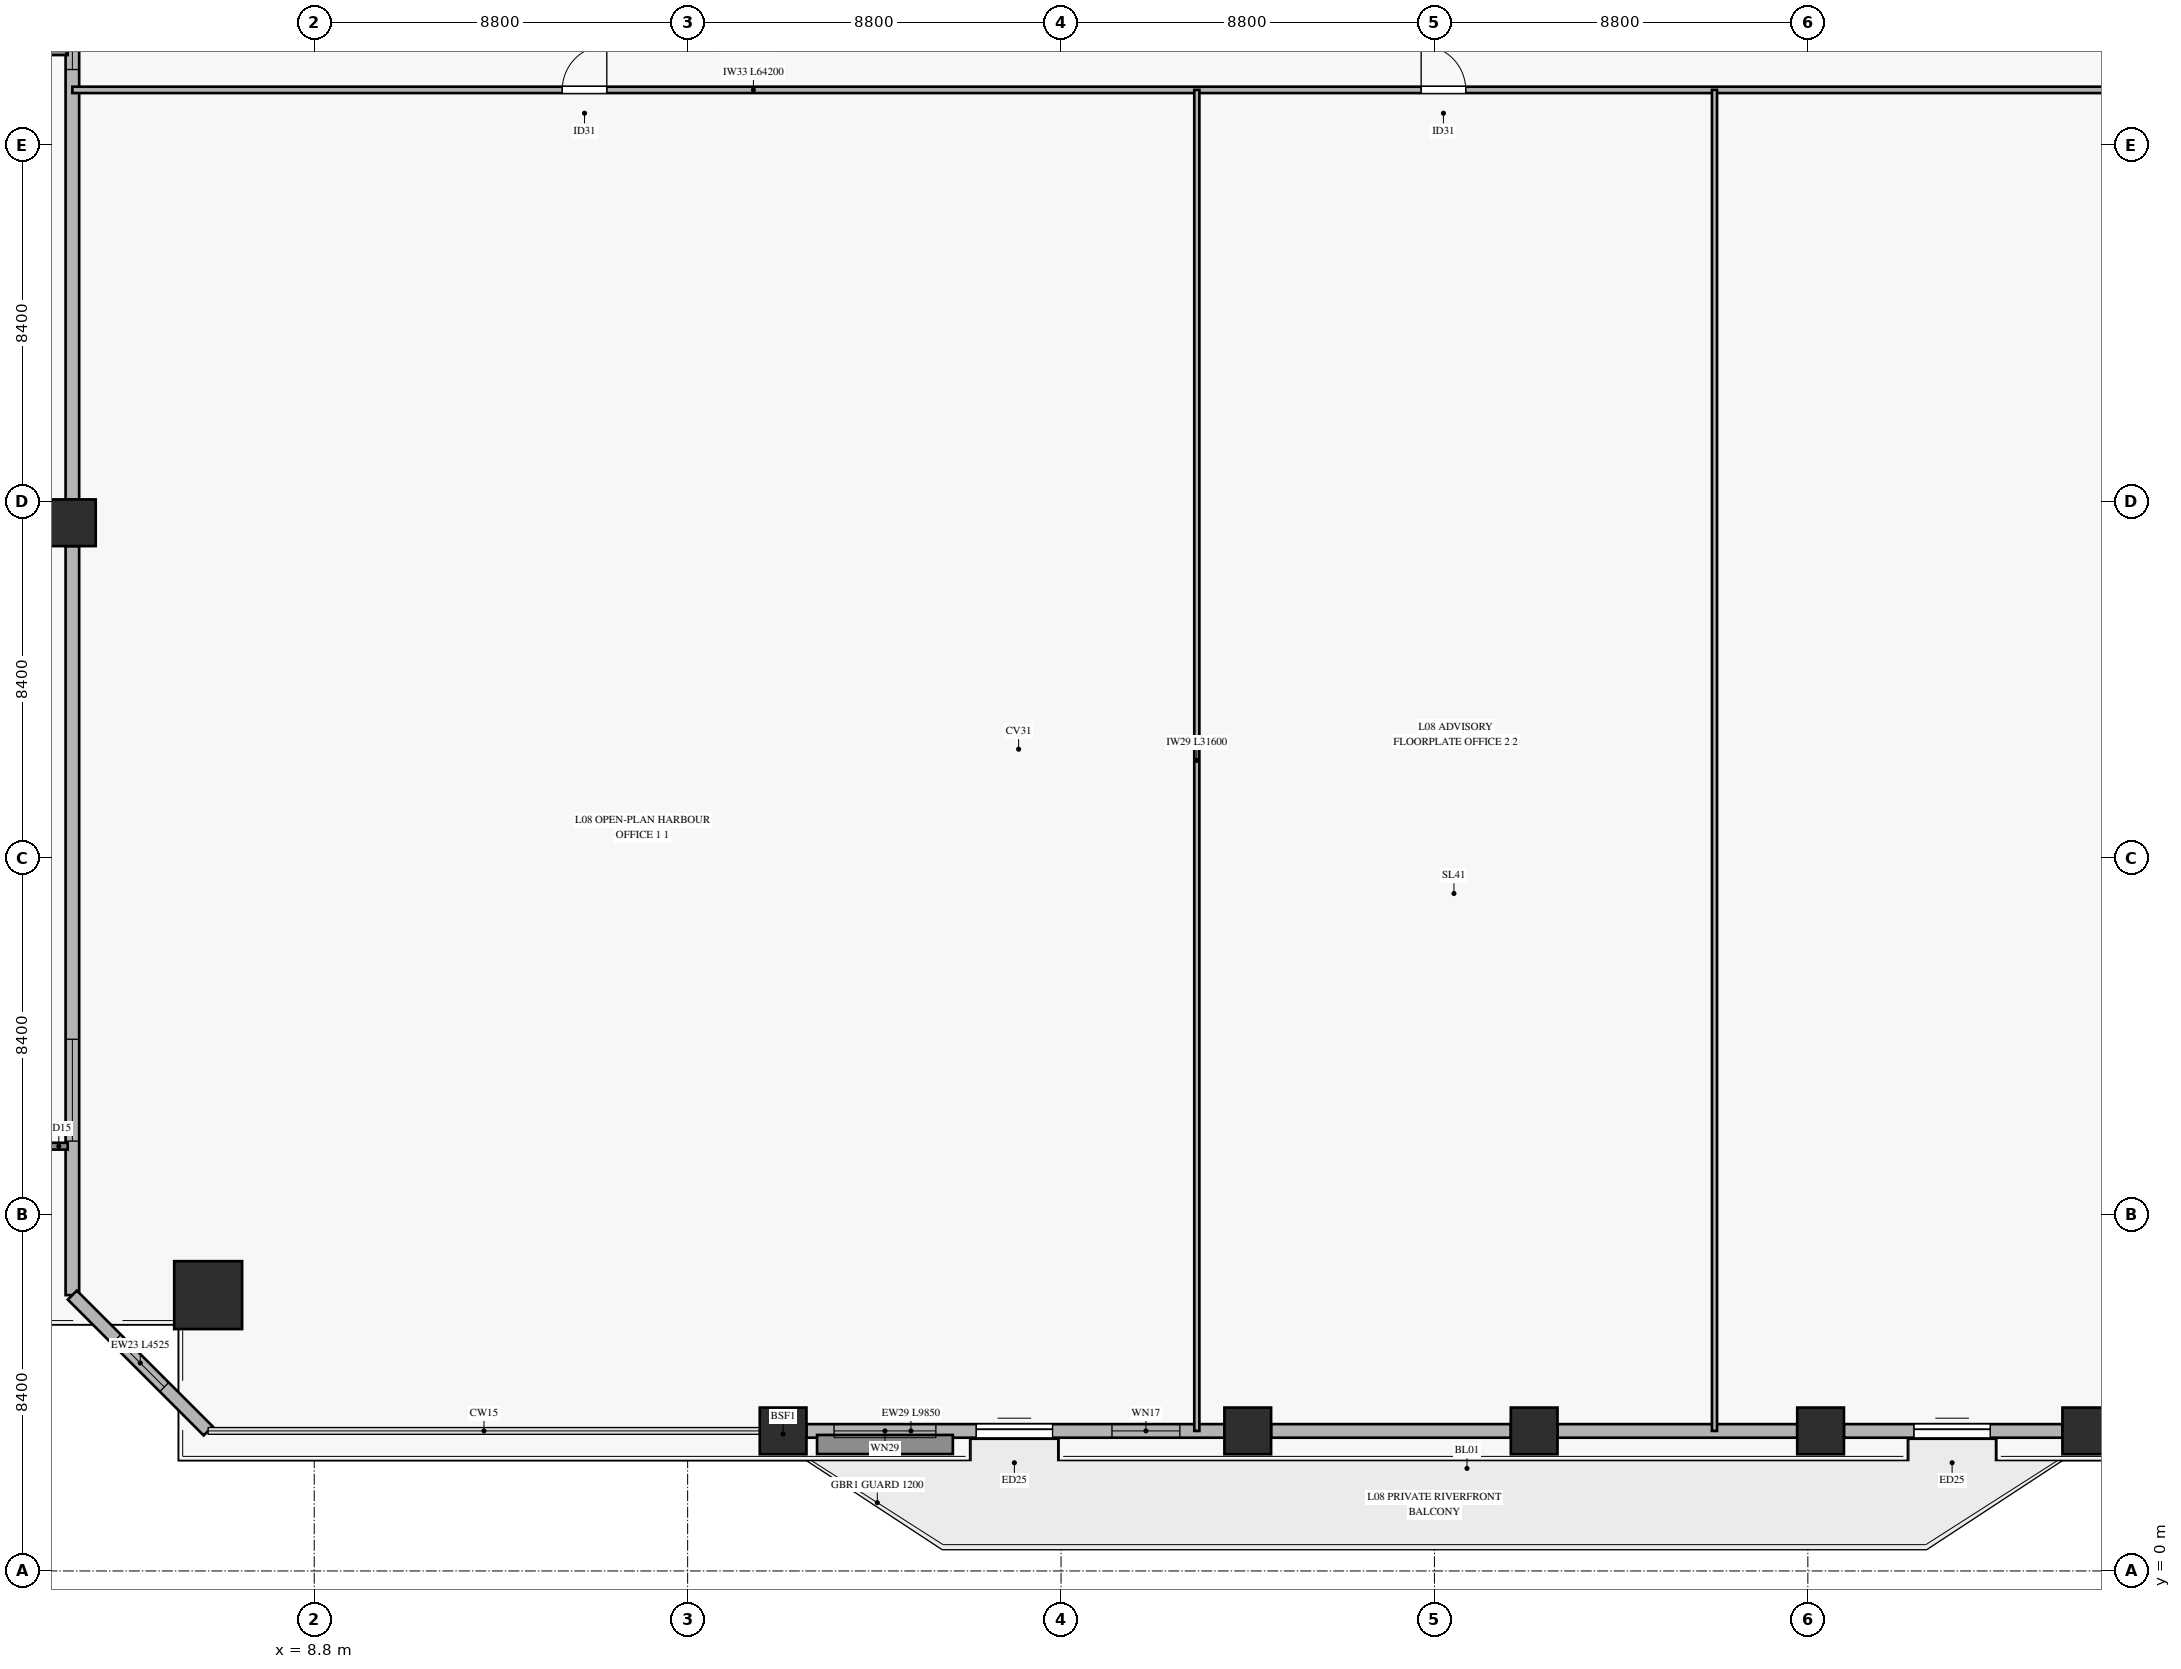
"""IFC4 building model, lengths in metres.
Left out: names, types, materials, properties, quantities, classifications, styles, units other than length and angle.
Written with IfcOpenShell. Run it as: python <this file> out.ifc"""

import sys

from ifc_helpers import new_model, si_unit, direction, frame, frame_2d, origin, origin_2d, place, context, subcontext, project, spatial, rectangle, hollow_rectangle, extrude, source, transform, mapped, element, fill, save


model = new_model("IFC4")
c1 = context("Model", 3, precision=1e-05, world=origin(), true_north=direction((0.0, 1.0)))
c2 = subcontext(c1, "Body", "Model", "MODEL_VIEW")
j1 = project(units=[si_unit("LENGTHUNIT", "METRE"), si_unit("PLANEANGLEUNIT", "RADIAN")], contexts=[c1])
p1 = place(None, origin())
s1 = spatial("IfcSite", under=j1, at=p1, CompositionType="ELEMENT")
p2 = place(p1, origin())
s2 = spatial("IfcBuilding", under=s1, at=p2, CompositionType="ELEMENT")
p3 = place(p2, frame((0.0, 0.0, 33.2)))
s3 = spatial("IfcBuildingStorey", under=s2, at=p3, CompositionType="ELEMENT", Elevation=33.2)
m1 = source(origin(), c2, "Body", "SweptSolid", [
    extrude(hollow_rectangle(XDim=1.6, YDim=1.6, WallThickness=0.075, at=origin_2d()), origin(), (0.0, 0.0, 1.0), 3.72),
])
p4 = place(p3, frame((6.3, 6.5, 0.0), z_axis=(0.056182353256, 0.134680127199, 0.989295105881), x_axis=(-0.922917163749, 0.384998582929, 0.0)))
e1 = element("IfcColumn", 1, at=p4, inside=s3, PredefinedType="COLUMN", context=c2, shape_type="MappedRepresentation", body=[
    mapped(m1, transform((0.0, 0.0, 0.0), x_axis=(1.0, 0.0, 0.0), y_axis=(0.0, 1.0, 0.0), z_axis=(0.0, 0.0, 1.0), scale=1.0)),
])
m2 = source(origin(), c2, "Body", "SweptSolid", [
    extrude(hollow_rectangle(XDim=1.1, YDim=1.1, WallThickness=0.05, at=origin_2d()), origin(), (0.0, 0.0, 1.0), 3.718),
])
for number, where, z_axis, x_axis in (
    (2, (19.85, 3.3, 0.0), (0.0, 0.142, 0.99), (-1.0, 0.0, 0.0)),
    (3, (30.8, 3.3, 0.0), (0.0, 0.142, 0.99), (-1.0, 0.0, 0.0)),
    (4, (37.55, 3.3, 0.0), (0.0, 0.142, 0.99), (-1.0, 0.0, 0.0)),
    (5, (44.3, 3.3, 0.0), (0.0, 0.142, 0.99), (-1.0, 0.0, 0.0)),
    (6, (50.55, 3.3, 0.0), (0.0, 0.142, 0.99), (-1.0, 0.0, 0.0)),
):
    element("IfcColumn", number, at=place(p3, frame(where, z_axis=z_axis, x_axis=x_axis)), inside=s3, PredefinedType="COLUMN", context=c2, shape_type="MappedRepresentation", body=[
        mapped(m2, transform((0.0, 0.0, 0.0), x_axis=(1.0, 0.0, 0.0), y_axis=(0.0, 1.0, 0.0), z_axis=(0.0, 0.0, 1.0), scale=1.0)),
    ])
m3 = source(origin(), c2, "Body", "SweptSolid", [
    extrude(hollow_rectangle(XDim=1.1, YDim=1.1, WallThickness=0.05, at=origin_2d()), origin(), (0.0, 0.0, 1.0), 3.697),
])
p5 = place(p3, frame((3.1, 24.7, 0.0), z_axis=(0.063531823494, 0.071126584099, 0.995441970402), x_axis=(-0.745802491979, 0.666167128398, 0.0)))
e7 = element("IfcColumn", 7, at=p5, inside=s3, PredefinedType="COLUMN", context=c2, shape_type="MappedRepresentation", body=[
    mapped(m3, transform((0.0, 0.0, 0.0), x_axis=(1.0, 0.0, 0.0), y_axis=(0.0, 1.0, 0.0), z_axis=(0.0, 0.0, 1.0), scale=1.0)),
])
p6 = place(p3, frame((20.4, 3.3, 0.0), z_axis=(0.0, 0.0, 1.0), x_axis=(1.0, 0.0, 0.0)))
e8 = element("IfcWall", 8, at=p6, inside=s3, PredefinedType="SOLIDWALL", context=c2, shape_type="SweptSolid", body=[
    extrude(rectangle(XDim=9.85, YDim=0.32, at=frame_2d((4.925, 0.0))), origin(), (0.0, 0.0, 1.0), 3.16),
])
p7 = place(p6, frame((4.0, 0.0, 0.0)))
e9 = element("IfcOpeningElement", 9, at=p7, cuts=e8, PredefinedType="OPENING", context=c2, shape_type="SweptSolid", body=[
    extrude(rectangle(XDim=1.8, YDim=2.25, at=frame_2d((0.9, 1.125))), frame((0.0, 0.17, 0.0), z_axis=(0.0, -1.0, 0.0), x_axis=(1.0, 0.0, 0.0)), (0.0, 0.0, 1.0), 0.34),
])
p8 = place(p6, frame((0.65, 0.0, 0.45)))
e10 = element("IfcOpeningElement", 10, at=p8, cuts=e8, PredefinedType="OPENING", context=c2, shape_type="SweptSolid", body=[
    extrude(rectangle(XDim=2.4, YDim=2.1, at=frame_2d((1.2, 1.05))), frame((0.0, 0.17, 0.0), z_axis=(0.0, -1.0, 0.0), x_axis=(1.0, 0.0, 0.0)), (0.0, 0.0, 1.0), 0.34),
])
p9 = place(p6, frame((7.2, 0.0, 0.45)))
e11 = element("IfcOpeningElement", 11, at=p9, cuts=e8, PredefinedType="OPENING", context=c2, shape_type="SweptSolid", body=[
    extrude(rectangle(XDim=1.6, YDim=2.0, at=frame_2d((0.8, 1.0))), frame((0.0, 0.17, 0.0), z_axis=(0.0, -1.0, 0.0), x_axis=(1.0, 0.0, 0.0)), (0.0, 0.0, 1.0), 0.34),
])
for number, where, z_axis, x_axis in (
    (12, (31.35, 3.3, 0.0), (0.0, 0.0, 1.0), (1.0, 0.0, 0.0)),
    (13, (38.1, 3.3, 0.0), (0.0, 0.0, 1.0), (1.0, 0.0, 0.0)),
):
    element("IfcWall", number, at=place(p3, frame(where, z_axis=z_axis, x_axis=x_axis)), inside=s3, PredefinedType="SOLIDWALL", context=c2, shape_type="SweptSolid", body=[
        extrude(rectangle(XDim=5.65, YDim=0.32, at=frame_2d((2.825, 0.0))), origin(), (0.0, 0.0, 1.0), 3.16),
    ])
p10 = place(p3, frame((44.85, 3.3, 0.0), z_axis=(0.0, 0.0, 1.0), x_axis=(1.0, 0.0, 0.0)))
e14 = element("IfcWall", 14, at=p10, inside=s3, PredefinedType="SOLIDWALL", context=c2, shape_type="SweptSolid", body=[
    extrude(rectangle(XDim=5.15, YDim=0.32, at=frame_2d((2.575, 0.0))), origin(), (0.0, 0.0, 1.0), 3.16),
])
p11 = place(p10, frame((1.65, 0.0, 0.0)))
e15 = element("IfcOpeningElement", 15, at=p11, cuts=e14, PredefinedType="OPENING", context=c2, shape_type="SweptSolid", body=[
    extrude(rectangle(XDim=1.8, YDim=2.25, at=frame_2d((0.9, 1.125))), frame((0.0, 0.17, 0.0), z_axis=(0.0, -1.0, 0.0), x_axis=(1.0, 0.0, 0.0)), (0.0, 0.0, 1.0), 0.34),
])
p12 = place(p3, frame((3.1, 6.5, 0.0), z_axis=(0.0, 0.0, 1.0), x_axis=(0.0, 1.0, 0.0)))
e16 = element("IfcWall", 16, at=p12, inside=s3, PredefinedType="SOLIDWALL", context=c2, shape_type="SweptSolid", body=[
    extrude(rectangle(XDim=17.65, YDim=0.32, at=frame_2d((8.825, 0.0))), origin(), (0.0, 0.0, 1.0), 3.16),
])
p13 = place(p12, frame((3.629, 0.0, 0.45)))
e17 = element("IfcOpeningElement", 17, at=p13, cuts=e16, PredefinedType="OPENING", context=c2, shape_type="SweptSolid", body=[
    extrude(rectangle(XDim=2.4, YDim=2.1, at=frame_2d((1.2, 1.05))), frame((0.0, 0.17, 0.0), z_axis=(0.0, -1.0, 0.0), x_axis=(1.0, 0.0, 0.0)), (0.0, 0.0, 1.0), 0.34),
])
p14 = place(p3, frame((3.1, 25.25, 0.0), z_axis=(0.0, 0.0, 1.0), x_axis=(0.0, 1.0, 0.0)))
e18 = element("IfcWall", 18, at=p14, inside=s3, PredefinedType="SOLIDWALL", context=c2, shape_type="SweptSolid", body=[
    extrude(rectangle(XDim=17.65, YDim=0.32, at=frame_2d((8.825, 0.0))), origin(), (0.0, 0.0, 1.0), 3.16),
])
p15 = place(p14, frame((10.13, 0.0, 0.45)))
e19 = element("IfcOpeningElement", 19, at=p15, cuts=e18, PredefinedType="OPENING", context=c2, shape_type="SweptSolid", body=[
    extrude(rectangle(XDim=1.6, YDim=2.0, at=frame_2d((0.8, 1.0))), frame((0.0, 0.17, 0.0), z_axis=(0.0, -1.0, 0.0), x_axis=(1.0, 0.0, 0.0)), (0.0, 0.0, 1.0), 0.34),
])
p16 = place(p3, frame((3.1, 6.5, 0.0), z_axis=(0.0, 0.0, 1.0), x_axis=(0.707106781187, -0.707106781187, 0.0)))
e20 = element("IfcWall", 20, at=p16, inside=s3, PredefinedType="SOLIDWALL", context=c2, shape_type="SweptSolid", body=[
    extrude(rectangle(XDim=4.525, YDim=0.3, at=frame_2d((2.263, 0.0))), origin(), (0.0, 0.0, 1.0), 3.16),
])
p17 = place(p16, frame((1.463, 0.0, 0.45)))
e21 = element("IfcOpeningElement", 21, at=p17, cuts=e20, PredefinedType="OPENING", context=c2, shape_type="SweptSolid", body=[
    extrude(rectangle(XDim=1.6, YDim=2.0, at=frame_2d((0.8, 1.0))), frame((0.0, 0.16, 0.0), z_axis=(0.0, -1.0, 0.0), x_axis=(1.0, 0.0, 0.0)), (0.0, 0.0, 1.0), 0.32),
])
p18 = place(p3, frame((3.1, 34.9, 0.0), z_axis=(0.0, 0.0, 1.0), x_axis=(1.0, 0.0, 0.0)))
e22 = element("IfcWall", 22, at=p18, inside=s3, PredefinedType="PARTITIONING", context=c2, shape_type="SweptSolid", body=[
    extrude(rectangle(XDim=64.2, YDim=0.15, at=frame_2d((32.1, 0.0))), origin(), (0.0, 0.0, 1.0), 2.765),
])
p19 = place(p18, frame((11.545, 0.0, 0.0)))
e23 = element("IfcOpeningElement", 23, at=p19, cuts=e22, PredefinedType="OPENING", context=c2, shape_type="SweptSolid", body=[
    extrude(rectangle(XDim=1.05, YDim=2.15, at=frame_2d((0.525, 1.075))), frame((0.0, 0.085, 0.0), z_axis=(0.0, -1.0, 0.0), x_axis=(1.0, 0.0, 0.0)), (0.0, 0.0, 1.0), 0.17),
])
p20 = place(p18, frame((31.787, 0.0, 0.0)))
e24 = element("IfcOpeningElement", 24, at=p20, cuts=e22, PredefinedType="OPENING", context=c2, shape_type="SweptSolid", body=[
    extrude(rectangle(XDim=1.05, YDim=2.15, at=frame_2d((0.525, 1.075))), frame((0.0, 0.085, 0.0), z_axis=(0.0, -1.0, 0.0), x_axis=(1.0, 0.0, 0.0)), (0.0, 0.0, 1.0), 0.17),
])
p21 = place(p18, frame((49.39, 0.0, 0.0)))
e25 = element("IfcOpeningElement", 25, at=p21, cuts=e22, PredefinedType="OPENING", context=c2, shape_type="SweptSolid", body=[
    extrude(rectangle(XDim=1.05, YDim=2.15, at=frame_2d((0.525, 1.075))), frame((0.0, 0.085, 0.0), z_axis=(0.0, -1.0, 0.0), x_axis=(1.0, 0.0, 0.0)), (0.0, 0.0, 1.0), 0.17),
])
for number, where, z_axis, x_axis in (
    (26, (29.6, 3.3, 0.0), (0.0, 0.0, 1.0), (0.0, 1.0, 0.0)),
    (27, (41.8, 3.3, 0.0), (0.0, 0.0, 1.0), (0.0, 1.0, 0.0)),
):
    element("IfcWall", number, at=place(p3, frame(where, z_axis=z_axis, x_axis=x_axis)), inside=s3, PredefinedType="PARTITIONING", context=c2, shape_type="SweptSolid", body=[
        extrude(rectangle(XDim=31.6, YDim=0.12, at=frame_2d((15.8, 0.0))), origin(), (0.0, 0.0, 1.0), 3.165),
    ])
m4 = source(origin(), c2, "Body", "SweptSolid", [
    extrude(rectangle(XDim=1.8, YDim=2.25, at=frame_2d((0.9, 1.125))), frame((0.0, 0.025, 0.0), z_axis=(0.0, -1.0, 0.0), x_axis=(1.0, 0.0, 0.0)), (0.0, 0.0, 1.0), 0.05),
])
p22 = place(p7, origin())
e28 = element("IfcDoor", 28, at=p22, inside=s3, OperationType="SLIDING_TO_LEFT", PredefinedType="DOOR", context=c2, shape_type="MappedRepresentation", body=[
    mapped(m4, transform((0.0, 0.0, 0.0), x_axis=(1.0, 0.0, 0.0), y_axis=(0.0, 1.0, 0.0), z_axis=(0.0, 0.0, 1.0), scale=1.0)),
])
fill(e9, e28)
m5 = source(origin(), c2, "Body", "SweptSolid", [
    extrude(rectangle(XDim=2.4, YDim=2.1, at=frame_2d((1.2, 1.05))), frame((0.0, 0.03, 0.0), z_axis=(0.0, -1.0, 0.0), x_axis=(1.0, 0.0, 0.0)), (0.0, 0.0, 1.0), 0.06),
])
p23 = place(p8, origin())
e29 = element("IfcWindow", 29, at=p23, inside=s3, PartitioningType="SINGLE_PANEL", PredefinedType="WINDOW", context=c2, shape_type="MappedRepresentation", body=[
    mapped(m5, transform((0.0, 0.0, 0.0), x_axis=(1.0, 0.0, 0.0), y_axis=(0.0, 1.0, 0.0), z_axis=(0.0, 0.0, 1.0), scale=1.0)),
])
fill(e10, e29)
m6 = source(origin(), c2, "Body", "SweptSolid", [
    extrude(rectangle(XDim=1.6, YDim=2.0, at=frame_2d((0.8, 1.0))), frame((0.0, 0.03, 0.0), z_axis=(0.0, -1.0, 0.0), x_axis=(1.0, 0.0, 0.0)), (0.0, 0.0, 1.0), 0.06),
])
p24 = place(p9, origin())
e30 = element("IfcWindow", 30, at=p24, inside=s3, PartitioningType="SINGLE_PANEL", PredefinedType="WINDOW", context=c2, shape_type="MappedRepresentation", body=[
    mapped(m6, transform((0.0, 0.0, 0.0), x_axis=(1.0, 0.0, 0.0), y_axis=(0.0, 1.0, 0.0), z_axis=(0.0, 0.0, 1.0), scale=1.0)),
])
fill(e11, e30)
p25 = place(p11, origin())
e31 = element("IfcDoor", 31, at=p25, inside=s3, OperationType="SLIDING_TO_LEFT", PredefinedType="DOOR", context=c2, shape_type="MappedRepresentation", body=[
    mapped(m4, transform((0.0, 0.0, 0.0), x_axis=(1.0, 0.0, 0.0), y_axis=(0.0, 1.0, 0.0), z_axis=(0.0, 0.0, 1.0), scale=1.0)),
])
fill(e15, e31)
p26 = place(p13, origin())
e32 = element("IfcWindow", 32, at=p26, inside=s3, PartitioningType="SINGLE_PANEL", PredefinedType="WINDOW", context=c2, shape_type="MappedRepresentation", body=[
    mapped(m5, transform((0.0, 0.0, 0.0), x_axis=(1.0, 0.0, 0.0), y_axis=(0.0, 1.0, 0.0), z_axis=(0.0, 0.0, 1.0), scale=1.0)),
])
fill(e17, e32)
p27 = place(p15, origin())
e33 = element("IfcWindow", 33, at=p27, inside=s3, PartitioningType="SINGLE_PANEL", PredefinedType="WINDOW", context=c2, shape_type="MappedRepresentation", body=[
    mapped(m6, transform((0.0, 0.0, 0.0), x_axis=(1.0, 0.0, 0.0), y_axis=(0.0, 1.0, 0.0), z_axis=(0.0, 0.0, 1.0), scale=1.0)),
])
fill(e19, e33)
p28 = place(p17, origin())
e34 = element("IfcWindow", 34, at=p28, inside=s3, PartitioningType="SINGLE_PANEL", PredefinedType="WINDOW", context=c2, shape_type="MappedRepresentation", body=[
    mapped(m6, transform((0.0, 0.0, 0.0), x_axis=(1.0, 0.0, 0.0), y_axis=(0.0, 1.0, 0.0), z_axis=(0.0, 0.0, 1.0), scale=1.0)),
])
fill(e21, e34)
m7 = source(origin(), c2, "Body", "SweptSolid", [
    extrude(rectangle(XDim=1.05, YDim=2.15, at=frame_2d((0.525, 1.075))), frame((0.0, 0.025, 0.0), z_axis=(0.0, -1.0, 0.0), x_axis=(1.0, 0.0, 0.0)), (0.0, 0.0, 1.0), 0.05),
])
p29 = place(p19, origin())
e35 = element("IfcDoor", 35, at=p29, inside=s3, OperationType="SINGLE_SWING_RIGHT", PredefinedType="DOOR", context=c2, shape_type="MappedRepresentation", body=[
    mapped(m7, transform((0.0, 0.0, 0.0), x_axis=(1.0, 0.0, 0.0), y_axis=(0.0, 1.0, 0.0), z_axis=(0.0, 0.0, 1.0), scale=1.0)),
])
fill(e23, e35)
p30 = place(p20, origin())
e36 = element("IfcDoor", 36, at=p30, inside=s3, OperationType="SINGLE_SWING_LEFT", PredefinedType="DOOR", context=c2, shape_type="MappedRepresentation", body=[
    mapped(m7, transform((0.0, 0.0, 0.0), x_axis=(1.0, 0.0, 0.0), y_axis=(0.0, 1.0, 0.0), z_axis=(0.0, 0.0, 1.0), scale=1.0)),
])
fill(e24, e36)
save(model, sys.argv[1])
